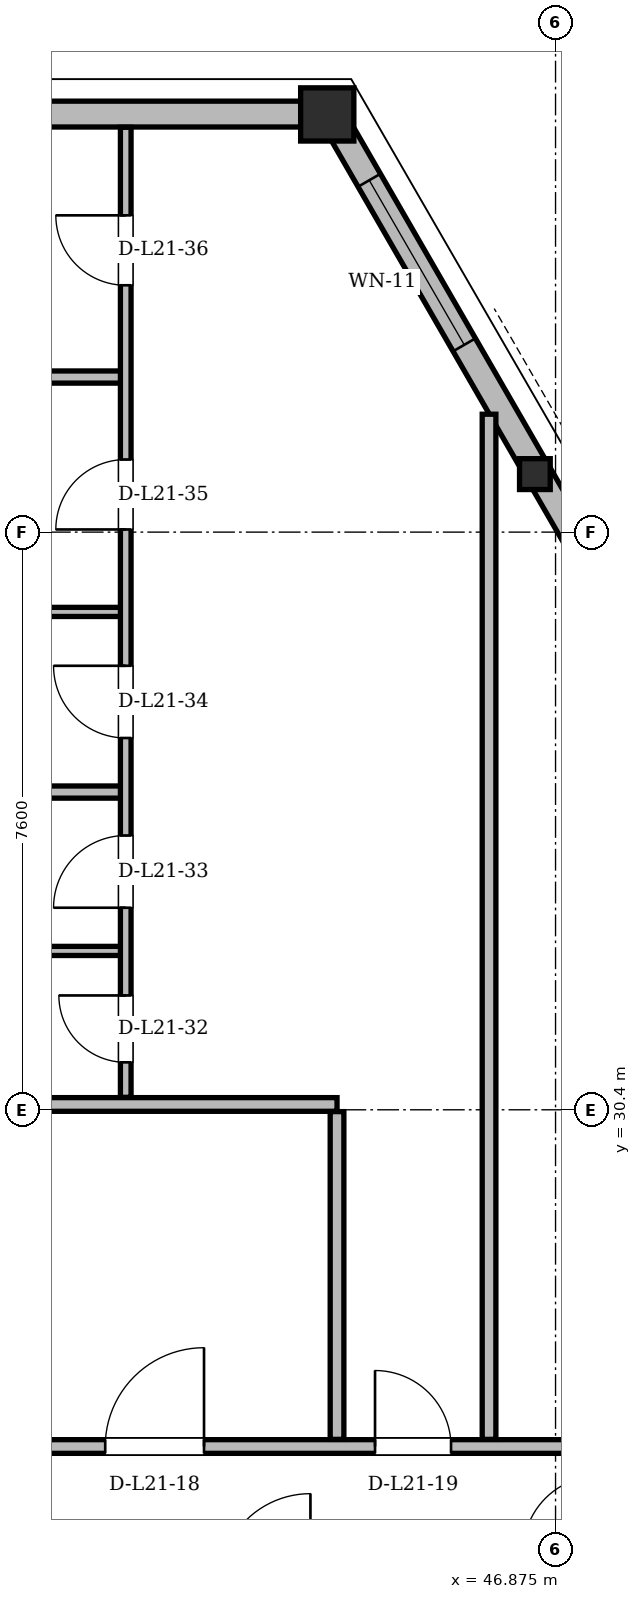
"""IFC4 building model, lengths in metres.
Left out: names, types, materials, properties, quantities, classifications, styles, units other than length and angle.
Written with IfcOpenShell. Run it as: python <this file> out.ifc"""

import sys

from ifc_helpers import new_model, si_unit, direction, frame, frame_2d, origin, origin_2d, place, context, subcontext, project, spatial, rectangle, hollow_rectangle, i_section, extrude, element, fill, save


model = new_model("IFC4")
c1 = context("Model", 3, precision=1e-05, world=origin(), true_north=direction((0.0, 1.0)))
c2 = subcontext(c1, "Body", "Model", "MODEL_VIEW")
j1 = project(units=[si_unit("LENGTHUNIT", "METRE"), si_unit("PLANEANGLEUNIT", "RADIAN")], contexts=[c1])
p1 = place(None, origin())
s1 = spatial("IfcSite", under=j1, at=p1, CompositionType="ELEMENT")
p2 = place(p1, origin())
s2 = spatial("IfcBuilding", under=s1, at=p2, CompositionType="ELEMENT")
p3 = place(p2, frame((0.0, 0.0, 82.5)))
s3 = spatial("IfcBuildingStorey", under=s2, at=p3, CompositionType="ELEMENT", Elevation=82.5)
p4 = place(p3, frame((43.921, 43.5, 0.004), z_axis=(-0.027795269096, -0.002582445539, 0.999610301063), x_axis=(0.092511107085, -0.995711652571, 0.0)))
e1 = element("IfcColumn", 1, at=p4, inside=s3, PredefinedType="COLUMN", context=c2, shape_type="SweptSolid", body=[
    extrude(hollow_rectangle(XDim=0.7, YDim=0.7, WallThickness=0.055, at=origin_2d()), origin(), (0.0, 0.0, 1.0), 3.593),
])
p5 = place(p3, frame((46.65, 38.773, 0.004), z_axis=(-0.025961307385, -0.005776730701, 0.999646257384), x_axis=(0.2172010113, -0.976126897842, 0.0)))
e2 = element("IfcColumn", 2, at=p5, inside=s3, PredefinedType="COLUMN", context=c2, shape_type="SweptSolid", body=[
    extrude(i_section(OverallWidth=0.404, OverallDepth=0.406, WebThickness=0.027, FlangeThickness=0.044, at=origin_2d()), origin(), (0.0, 0.0, 1.0), 3.592),
])
p6 = place(p3, frame((60.975, 13.961, 0.0), z_axis=(0.0, 0.0, 1.0), x_axis=(-0.499998999238, 0.866025981574, 0.0)))
e3 = element("IfcWall", 3, at=p6, inside=s3, PredefinedType="SOLIDWALL", context=c2, shape_type="SweptSolid", body=[
    extrude(rectangle(XDim=34.108, YDim=0.34, at=frame_2d((17.054, 0.0))), origin(), (0.0, 0.0, 1.0), 2.578),
])
p7 = place(p6, frame((6.369, 0.0, 0.0)))
e4 = element("IfcOpeningElement", 4, at=p7, cuts=e3, PredefinedType="OPENING", context=c2, shape_type="SweptSolid", body=[
    extrude(rectangle(XDim=1.5, YDim=2.2, at=frame_2d((0.75, 1.1))), frame((0.0, 0.17, 0.0), z_axis=(0.0, -1.0, 0.0), x_axis=(1.0, 0.0, 0.0)), (0.0, 0.0, 1.0), 0.34),
])
p8 = place(p6, frame((24.784, 0.0, 0.0)))
e5 = element("IfcOpeningElement", 5, at=p8, cuts=e3, PredefinedType="OPENING", context=c2, shape_type="SweptSolid", body=[
    extrude(rectangle(XDim=1.5, YDim=2.2, at=frame_2d((0.75, 1.1))), frame((0.0, 0.17, 0.0), z_axis=(0.0, -1.0, 0.0), x_axis=(1.0, 0.0, 0.0)), (0.0, 0.0, 1.0), 0.34),
])
p9 = place(p6, frame((1.56, 0.0, 0.85)))
e6 = element("IfcOpeningElement", 6, at=p9, cuts=e3, PredefinedType="OPENING", context=c2, shape_type="SweptSolid", body=[
    extrude(rectangle(XDim=1.2, YDim=1.48, at=frame_2d((0.6, 0.74))), frame((0.0, 0.17, 0.0), z_axis=(0.0, -1.0, 0.0), x_axis=(1.0, 0.0, 0.0)), (0.0, 0.0, 1.0), 0.34),
])
p10 = place(p6, frame((30.603, 0.0, 0.85)))
e7 = element("IfcOpeningElement", 7, at=p10, cuts=e3, PredefinedType="OPENING", context=c2, shape_type="SweptSolid", body=[
    extrude(rectangle(XDim=2.5, YDim=1.618, at=frame_2d((1.25, 0.809))), frame((0.0, 0.17, 0.0), z_axis=(0.0, -1.0, 0.0), x_axis=(1.0, 0.0, 0.0)), (0.0, 0.0, 1.0), 0.34),
])
p11 = place(p6, frame((20.212, 0.0, 0.85)))
e8 = element("IfcOpeningElement", 8, at=p11, cuts=e3, PredefinedType="OPENING", context=c2, shape_type="SweptSolid", body=[
    extrude(rectangle(XDim=2.4, YDim=1.618, at=frame_2d((1.2, 0.809))), frame((0.0, 0.17, 0.0), z_axis=(0.0, -1.0, 0.0), x_axis=(1.0, 0.0, 0.0)), (0.0, 0.0, 1.0), 0.34),
])
p12 = place(p6, frame((15.221, 0.0, 0.85)))
e9 = element("IfcOpeningElement", 9, at=p12, cuts=e3, PredefinedType="OPENING", context=c2, shape_type="SweptSolid", body=[
    extrude(rectangle(XDim=1.2, YDim=1.48, at=frame_2d((0.6, 0.74))), frame((0.0, 0.17, 0.0), z_axis=(0.0, -1.0, 0.0), x_axis=(1.0, 0.0, 0.0)), (0.0, 0.0, 1.0), 0.34),
])
p13 = place(p6, frame((17.561, 0.0, 0.85)))
e10 = element("IfcOpeningElement", 10, at=p13, cuts=e3, PredefinedType="OPENING", context=c2, shape_type="SweptSolid", body=[
    extrude(rectangle(XDim=1.4, YDim=1.6, at=frame_2d((0.7, 0.8))), frame((0.0, 0.17, 0.0), z_axis=(0.0, -1.0, 0.0), x_axis=(1.0, 0.0, 0.0)), (0.0, 0.0, 1.0), 0.34),
])
p14 = place(p3, frame((43.921, 43.5, 0.0), z_axis=(0.0, 0.0, 1.0), x_axis=(-1.0, 0.0, 0.0)))
e11 = element("IfcWall", 11, at=p14, inside=s3, PredefinedType="SOLIDWALL", context=c2, shape_type="SweptSolid", body=[
    extrude(rectangle(XDim=12.842, YDim=0.34, at=frame_2d((6.421, 0.0))), origin(), (0.0, 0.0, 1.0), 2.578),
])
p15 = place(p14, frame((3.708, 0.0, 0.85)))
e12 = element("IfcOpeningElement", 12, at=p15, cuts=e11, PredefinedType="OPENING", context=c2, shape_type="SweptSolid", body=[
    extrude(rectangle(XDim=1.2, YDim=1.48, at=frame_2d((0.6, 0.74))), frame((0.0, 0.17, 0.0), z_axis=(0.0, -1.0, 0.0), x_axis=(1.0, 0.0, 0.0)), (0.0, 0.0, 1.0), 0.34),
])
p16 = place(p3, frame((27.55, 25.97, 0.0), z_axis=(0.0, 0.0, 1.0), x_axis=(1.0, 0.0, 0.0)))
e13 = element("IfcWall", 13, at=p16, inside=s3, PredefinedType="PARTITIONING", context=c2, shape_type="SweptSolid", body=[
    extrude(rectangle(XDim=19.9, YDim=0.18, at=frame_2d((9.95, 0.0))), origin(), (0.0, 0.0, 1.0), 2.814),
])
p17 = place(p16, frame((0.425, 0.0, 0.0)))
e14 = element("IfcOpeningElement", 14, at=p17, cuts=e13, PredefinedType="OPENING", context=c2, shape_type="SweptSolid", body=[
    extrude(rectangle(XDim=1.0, YDim=2.18, at=frame_2d((0.5, 1.09))), frame((0.0, 0.09, 0.0), z_axis=(0.0, -1.0, 0.0), x_axis=(1.0, 0.0, 0.0)), (0.0, 0.0, 1.0), 0.18),
])
p18 = place(p16, frame((4.222, 0.0, 0.0)))
e15 = element("IfcOpeningElement", 15, at=p18, cuts=e13, PredefinedType="OPENING", context=c2, shape_type="SweptSolid", body=[
    extrude(rectangle(XDim=1.0, YDim=2.18, at=frame_2d((0.5, 1.09))), frame((0.0, 0.09, 0.0), z_axis=(0.0, -1.0, 0.0), x_axis=(1.0, 0.0, 0.0)), (0.0, 0.0, 1.0), 0.18),
])
p19 = place(p16, frame((13.4, 0.0, 0.0)))
e16 = element("IfcOpeningElement", 16, at=p19, cuts=e13, PredefinedType="OPENING", context=c2, shape_type="SweptSolid", body=[
    extrude(rectangle(XDim=1.3, YDim=2.2, at=frame_2d((0.65, 1.1))), frame((0.0, 0.09, 0.0), z_axis=(0.0, -1.0, 0.0), x_axis=(1.0, 0.0, 0.0)), (0.0, 0.0, 1.0), 0.18),
])
p20 = place(p16, frame((16.95, 0.0, 0.0)))
e17 = element("IfcOpeningElement", 17, at=p20, cuts=e13, PredefinedType="OPENING", context=c2, shape_type="SweptSolid", body=[
    extrude(rectangle(XDim=1.0, YDim=2.18, at=frame_2d((0.5, 1.09))), frame((0.0, 0.09, 0.0), z_axis=(0.0, -1.0, 0.0), x_axis=(1.0, 0.0, 0.0)), (0.0, 0.0, 1.0), 0.18),
])
p21 = place(p3, frame((39.2, 30.47, 0.0), z_axis=(0.0, 0.0, 1.0), x_axis=(1.0, 0.0, 0.0)))
e18 = element("IfcWall", 18, at=p21, inside=s3, PredefinedType="PARTITIONING", context=c2, shape_type="SweptSolid", body=[
    extrude(rectangle(XDim=4.8, YDim=0.18, at=frame_2d((2.4, 0.0))), origin(), (0.0, 0.0, 1.0), 3.36),
])
p22 = place(p3, frame((37.95, 32.49, 0.0), z_axis=(0.0, 0.0, 1.0), x_axis=(1.0, 0.0, 0.0)))
e19 = element("IfcWall", 19, at=p22, inside=s3, PredefinedType="PARTITIONING", context=c2, shape_type="SweptSolid", body=[
    extrude(rectangle(XDim=3.27, YDim=0.12, at=frame_2d((1.635, 0.0))), origin(), (0.0, 0.0, 1.0), 3.36),
])
p23 = place(p3, frame((37.95, 34.58, 0.0), z_axis=(0.0, 0.0, 1.0), x_axis=(1.0, 0.0, 0.0)))
e20 = element("IfcWall", 20, at=p23, inside=s3, PredefinedType="PARTITIONING", context=c2, shape_type="SweptSolid", body=[
    extrude(rectangle(XDim=3.27, YDim=0.16, at=frame_2d((1.635, 0.0))), origin(), (0.0, 0.0, 1.0), 3.36),
])
p24 = place(p3, frame((37.95, 36.95, 0.0), z_axis=(0.0, 0.0, 1.0), x_axis=(1.0, 0.0, 0.0)))
e21 = element("IfcWall", 21, at=p24, inside=s3, PredefinedType="PARTITIONING", context=c2, shape_type="SweptSolid", body=[
    extrude(rectangle(XDim=3.27, YDim=0.12, at=frame_2d((1.635, 0.0))), origin(), (0.0, 0.0, 1.0), 3.36),
])
p25 = place(p3, frame((37.95, 40.04, 0.0), z_axis=(0.0, 0.0, 1.0), x_axis=(1.0, 0.0, 0.0)))
e22 = element("IfcWall", 22, at=p25, inside=s3, PredefinedType="PARTITIONING", context=c2, shape_type="SweptSolid", body=[
    extrude(rectangle(XDim=3.27, YDim=0.16, at=frame_2d((1.635, 0.0))), origin(), (0.0, 0.0, 1.0), 3.36),
])
p26 = place(p3, frame((41.22, 30.564, 0.0), z_axis=(0.0, 0.0, 1.0), x_axis=(0.0, 1.0, 0.0)))
e23 = element("IfcWall", 23, at=p26, inside=s3, PredefinedType="PARTITIONING", context=c2, shape_type="SweptSolid", body=[
    extrude(rectangle(XDim=12.762, YDim=0.14, at=frame_2d((6.381, 0.0))), origin(), (0.0, 0.0, 1.0), 3.36),
])
p27 = place(p26, frame((0.46, 0.0, 0.0)))
e24 = element("IfcOpeningElement", 24, at=p27, cuts=e23, PredefinedType="OPENING", context=c2, shape_type="SweptSolid", body=[
    extrude(rectangle(XDim=0.88, YDim=2.08, at=frame_2d((0.44, 1.04))), frame((0.0, 0.07, 0.0), z_axis=(0.0, -1.0, 0.0), x_axis=(1.0, 0.0, 0.0)), (0.0, 0.0, 1.0), 0.14),
])
p28 = place(p26, frame((2.494, 0.0, 0.0)))
e25 = element("IfcOpeningElement", 25, at=p28, cuts=e23, PredefinedType="OPENING", context=c2, shape_type="SweptSolid", body=[
    extrude(rectangle(XDim=0.95, YDim=2.1, at=frame_2d((0.475, 1.05))), frame((0.0, 0.07, 0.0), z_axis=(0.0, -1.0, 0.0), x_axis=(1.0, 0.0, 0.0)), (0.0, 0.0, 1.0), 0.14),
])
p29 = place(p26, frame((4.727, 0.0, 0.0)))
e26 = element("IfcOpeningElement", 26, at=p29, cuts=e23, PredefinedType="OPENING", context=c2, shape_type="SweptSolid", body=[
    extrude(rectangle(XDim=0.95, YDim=2.1, at=frame_2d((0.475, 1.05))), frame((0.0, 0.07, 0.0), z_axis=(0.0, -1.0, 0.0), x_axis=(1.0, 0.0, 0.0)), (0.0, 0.0, 1.0), 0.14),
])
p30 = place(p26, frame((7.471, 0.0, 0.0)))
e27 = element("IfcOpeningElement", 27, at=p30, cuts=e23, PredefinedType="OPENING", context=c2, shape_type="SweptSolid", body=[
    extrude(rectangle(XDim=0.92, YDim=2.12, at=frame_2d((0.46, 1.06))), frame((0.0, 0.07, 0.0), z_axis=(0.0, -1.0, 0.0), x_axis=(1.0, 0.0, 0.0)), (0.0, 0.0, 1.0), 0.14),
])
p31 = place(p26, frame((10.683, 0.0, 0.0)))
e28 = element("IfcOpeningElement", 28, at=p31, cuts=e23, PredefinedType="OPENING", context=c2, shape_type="SweptSolid", body=[
    extrude(rectangle(XDim=0.92, YDim=2.12, at=frame_2d((0.46, 1.06))), frame((0.0, 0.07, 0.0), z_axis=(0.0, -1.0, 0.0), x_axis=(1.0, 0.0, 0.0)), (0.0, 0.0, 1.0), 0.14),
])
p32 = place(p3, frame((44.0, 26.064, 0.0), z_axis=(0.0, 0.0, 1.0), x_axis=(0.0, 1.0, 0.0)))
e29 = element("IfcWall", 29, at=p32, inside=s3, PredefinedType="PARTITIONING", context=c2, shape_type="SweptSolid", body=[
    extrude(rectangle(XDim=4.312, YDim=0.18, at=frame_2d((2.156, 0.0))), origin(), (0.0, 0.0, 1.0), 2.946),
])
p33 = place(p3, frame((46.0, 26.064, 0.0), z_axis=(0.0, 0.0, 1.0), x_axis=(0.0, 1.0, 0.0)))
e30 = element("IfcWall", 30, at=p33, inside=s3, PredefinedType="PARTITIONING", context=c2, shape_type="SweptSolid", body=[
    extrude(rectangle(XDim=13.487, YDim=0.18, at=frame_2d((6.743, 0.0))), origin(), (0.0, 0.0, 1.0), 2.578),
])
p34 = place(p10, origin())
e31 = element("IfcWindow", 31, at=p34, inside=s3, PartitioningType="SINGLE_PANEL", PredefinedType="WINDOW", context=c2, shape_type="SweptSolid", body=[
    extrude(rectangle(XDim=2.5, YDim=1.618, at=frame_2d((1.25, 0.809))), frame((0.0, 0.03, 0.0), z_axis=(0.0, -1.0, 0.0), x_axis=(1.0, 0.0, 0.0)), (0.0, 0.0, 1.0), 0.06),
])
fill(e7, e31)
p35 = place(p19, origin())
e32 = element("IfcDoor", 32, at=p35, inside=s3, OperationType="SINGLE_SWING_RIGHT", PredefinedType="DOOR", context=c2, shape_type="SweptSolid", body=[
    extrude(rectangle(XDim=1.3, YDim=2.2, at=frame_2d((0.65, 1.1))), frame((0.0, 0.025, 0.0), z_axis=(0.0, -1.0, 0.0), x_axis=(1.0, 0.0, 0.0)), (0.0, 0.0, 1.0), 0.05),
])
fill(e16, e32)
p36 = place(p20, origin())
e33 = element("IfcDoor", 33, at=p36, inside=s3, OperationType="SINGLE_SWING_LEFT", PredefinedType="DOOR", context=c2, shape_type="SweptSolid", body=[
    extrude(rectangle(XDim=1.0, YDim=2.18, at=frame_2d((0.5, 1.09))), frame((0.0, 0.025, 0.0), z_axis=(0.0, -1.0, 0.0), x_axis=(1.0, 0.0, 0.0)), (0.0, 0.0, 1.0), 0.05),
])
fill(e17, e33)
p37 = place(p27, origin())
e34 = element("IfcDoor", 34, at=p37, inside=s3, OperationType="SINGLE_SWING_RIGHT", PredefinedType="DOOR", context=c2, shape_type="SweptSolid", body=[
    extrude(rectangle(XDim=0.88, YDim=2.08, at=frame_2d((0.44, 1.04))), frame((0.0, 0.025, 0.0), z_axis=(0.0, -1.0, 0.0), x_axis=(1.0, 0.0, 0.0)), (0.0, 0.0, 1.0), 0.05),
])
fill(e24, e34)
p38 = place(p28, origin())
e35 = element("IfcDoor", 35, at=p38, inside=s3, OperationType="SINGLE_SWING_LEFT", PredefinedType="DOOR", context=c2, shape_type="SweptSolid", body=[
    extrude(rectangle(XDim=0.95, YDim=2.1, at=frame_2d((0.475, 1.05))), frame((0.0, 0.025, 0.0), z_axis=(0.0, -1.0, 0.0), x_axis=(1.0, 0.0, 0.0)), (0.0, 0.0, 1.0), 0.05),
])
fill(e25, e35)
p39 = place(p29, origin())
e36 = element("IfcDoor", 36, at=p39, inside=s3, OperationType="SINGLE_SWING_RIGHT", PredefinedType="DOOR", context=c2, shape_type="SweptSolid", body=[
    extrude(rectangle(XDim=0.95, YDim=2.1, at=frame_2d((0.475, 1.05))), frame((0.0, 0.025, 0.0), z_axis=(0.0, -1.0, 0.0), x_axis=(1.0, 0.0, 0.0)), (0.0, 0.0, 1.0), 0.05),
])
fill(e26, e36)
p40 = place(p30, origin())
e37 = element("IfcDoor", 37, at=p40, inside=s3, OperationType="SINGLE_SWING_LEFT", PredefinedType="DOOR", context=c2, shape_type="SweptSolid", body=[
    extrude(rectangle(XDim=0.92, YDim=2.12, at=frame_2d((0.46, 1.06))), frame((0.0, 0.025, 0.0), z_axis=(0.0, -1.0, 0.0), x_axis=(1.0, 0.0, 0.0)), (0.0, 0.0, 1.0), 0.05),
])
fill(e27, e37)
p41 = place(p31, origin())
e38 = element("IfcDoor", 38, at=p41, inside=s3, OperationType="SINGLE_SWING_RIGHT", PredefinedType="DOOR", context=c2, shape_type="SweptSolid", body=[
    extrude(rectangle(XDim=0.92, YDim=2.12, at=frame_2d((0.46, 1.06))), frame((0.0, 0.025, 0.0), z_axis=(0.0, -1.0, 0.0), x_axis=(1.0, 0.0, 0.0)), (0.0, 0.0, 1.0), 0.05),
])
fill(e28, e38)
save(model, sys.argv[1])
